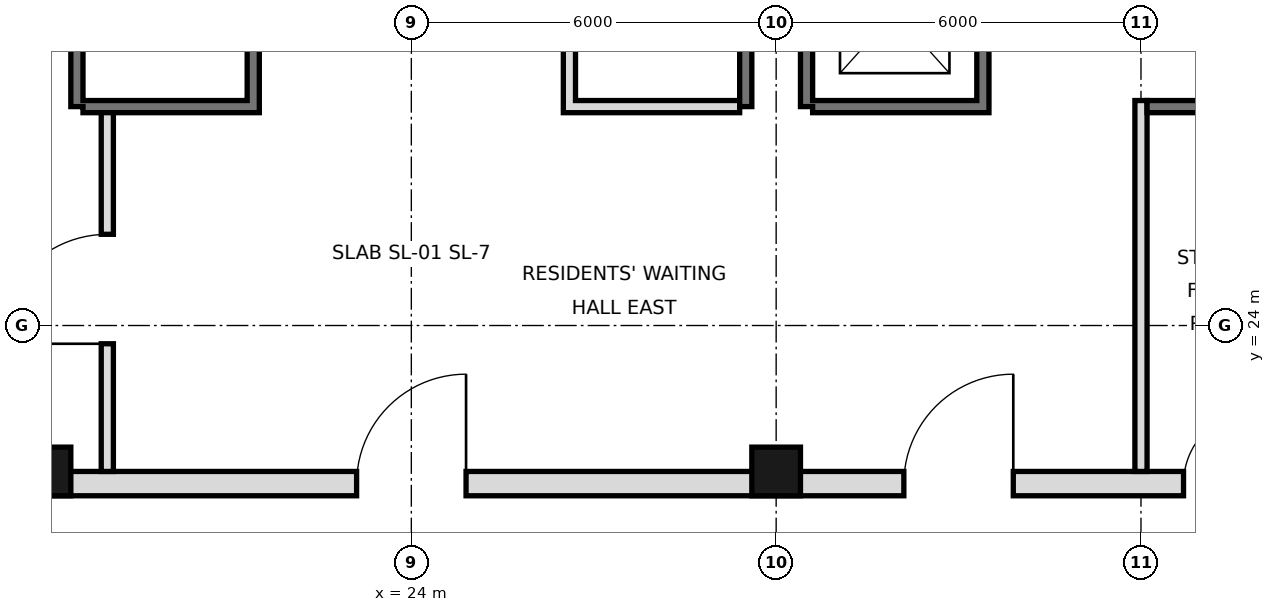
"""IFC4 building model, lengths in metres.
Left out: names, types, materials, properties, quantities, classifications, styles, units other than length and angle.
Written with IfcOpenShell. Run it as: python <this file> out.ifc"""

import sys

from ifc_helpers import new_model, si_unit, direction, frame, frame_2d, origin, origin_2d, place, context, subcontext, project, spatial, rectangle, hollow_rectangle, extrude, element, fill, save


model = new_model("IFC4")
c1 = context("Model", 3, precision=1e-05, world=origin(), true_north=direction((0.0, 1.0)))
c2 = subcontext(c1, "Body", "Model", "MODEL_VIEW")
j1 = project(units=[si_unit("LENGTHUNIT", "METRE"), si_unit("PLANEANGLEUNIT", "RADIAN")], contexts=[c1])
p1 = place(None, origin())
s1 = spatial("IfcSite", under=j1, at=p1, CompositionType="ELEMENT")
p2 = place(p1, origin())
s2 = spatial("IfcBuilding", under=s1, at=p2, CompositionType="ELEMENT")
p3 = place(p2, frame((0.0, 0.0, 174.4)))
s3 = spatial("IfcBuildingStorey", under=s2, at=p3, CompositionType="ELEMENT", Elevation=174.4)
for number, where, z_axis, x_axis in (
    (1, (18.0, 21.6, 0.0), (0.0, 0.0, 1.0), (1.0, 0.0, 0.0)),
    (2, (30.0, 21.6, 0.0), (0.0, 0.0, 1.0), (1.0, 0.0, 0.0)),
):
    element("IfcColumn", number, at=place(p3, frame(where, z_axis=z_axis, x_axis=x_axis)), inside=s3, PredefinedType="COLUMN", context=c2, shape_type="SweptSolid", body=[
        extrude(hollow_rectangle(XDim=0.8, YDim=0.8, WallThickness=0.045, at=origin_2d()), origin(), (0.0, 0.0, 1.0), 3.6),
    ])
for number, where, z_axis, x_axis in (
    (3, (18.5, 27.6, 0.0), (0.0, 0.0, 1.0), (0.0, 1.0, 0.0)),
    (4, (29.5, 27.6, 0.0), (0.0, 0.0, 1.0), (0.0, 1.0, 0.0)),
    (5, (30.5, 27.6, 0.0), (0.0, 0.0, 1.0), (0.0, 1.0, 0.0)),
):
    element("IfcWall", number, at=place(p3, frame(where, z_axis=z_axis, x_axis=x_axis)), inside=s3, PredefinedType="SOLIDWALL", context=c2, shape_type="SweptSolid", body=[
        extrude(rectangle(XDim=17.5, YDim=0.2, at=frame_2d((8.75, 0.0))), origin(), (0.0, 0.0, 1.0), 3.42),
    ])
p4 = place(p3, frame((5.6, 21.4, 0.0), z_axis=(0.0, 0.0, 1.0), x_axis=(1.0, 0.0, 0.0)))
e6 = element("IfcWall", 6, at=p4, inside=s3, PredefinedType="SOLIDWALL", context=c2, shape_type="SweptSolid", body=[
    extrude(rectangle(XDim=36.8, YDim=0.4, at=frame_2d((18.4, 0.0))), origin(), (0.0, 0.0, 1.0), 3.42),
])
p5 = place(p4, frame((8.5, 0.0, 0.0)))
e7 = element("IfcOpeningElement", 7, at=p5, cuts=e6, PredefinedType="OPENING", context=c2, shape_type="SweptSolid", body=[
    extrude(rectangle(XDim=1.8, YDim=2.1, at=frame_2d((0.9, 1.05))), frame((0.0, 0.21, 0.0), z_axis=(0.0, -1.0, 0.0), x_axis=(1.0, 0.0, 0.0)), (0.0, 0.0, 1.0), 0.42),
])
p6 = place(p4, frame((17.5, 0.0, 0.0)))
e8 = element("IfcOpeningElement", 8, at=p6, cuts=e6, PredefinedType="OPENING", context=c2, shape_type="SweptSolid", body=[
    extrude(rectangle(XDim=1.8, YDim=2.1, at=frame_2d((0.9, 1.05))), frame((0.0, 0.21, 0.0), z_axis=(0.0, -1.0, 0.0), x_axis=(1.0, 0.0, 0.0)), (0.0, 0.0, 1.0), 0.42),
])
p7 = place(p4, frame((26.5, 0.0, 0.0)))
e9 = element("IfcOpeningElement", 9, at=p7, cuts=e6, PredefinedType="OPENING", context=c2, shape_type="SweptSolid", body=[
    extrude(rectangle(XDim=1.8, YDim=2.1, at=frame_2d((0.9, 1.05))), frame((0.0, 0.21, 0.0), z_axis=(0.0, -1.0, 0.0), x_axis=(1.0, 0.0, 0.0)), (0.0, 0.0, 1.0), 0.42),
])
p8 = place(p4, frame((4.5, 0.0, 0.0)))
e10 = element("IfcOpeningElement", 10, at=p8, cuts=e6, PredefinedType="OPENING", context=c2, shape_type="SweptSolid", body=[
    extrude(rectangle(XDim=1.2, YDim=2.1, at=frame_2d((0.6, 1.05))), frame((0.0, 0.21, 0.0), z_axis=(0.0, -1.0, 0.0), x_axis=(1.0, 0.0, 0.0)), (0.0, 0.0, 1.0), 0.42),
])
p9 = place(p4, frame((31.1, 0.0, 0.0)))
e11 = element("IfcOpeningElement", 11, at=p9, cuts=e6, PredefinedType="OPENING", context=c2, shape_type="SweptSolid", body=[
    extrude(rectangle(XDim=1.2, YDim=2.1, at=frame_2d((0.6, 1.05))), frame((0.0, 0.21, 0.0), z_axis=(0.0, -1.0, 0.0), x_axis=(1.0, 0.0, 0.0)), (0.0, 0.0, 1.0), 0.42),
])
p10 = place(p3, frame((19.0, 21.6, 0.0), z_axis=(0.0, 0.0, 1.0), x_axis=(0.0, 1.0, 0.0)))
e12 = element("IfcWall", 12, at=p10, inside=s3, PredefinedType="PARTITIONING", context=c2, shape_type="SweptSolid", body=[
    extrude(rectangle(XDim=6.0, YDim=0.2, at=frame_2d((3.0, 0.0))), origin(), (0.0, 0.0, 1.0), 3.42),
])
p11 = place(p10, frame((2.1, 0.0, 0.0)))
e13 = element("IfcOpeningElement", 13, at=p11, cuts=e12, PredefinedType="OPENING", context=c2, shape_type="SweptSolid", body=[
    extrude(rectangle(XDim=1.8, YDim=2.1, at=frame_2d((0.9, 1.05))), frame((0.0, 0.11, 0.0), z_axis=(0.0, -1.0, 0.0), x_axis=(1.0, 0.0, 0.0)), (0.0, 0.0, 1.0), 0.22),
])
p12 = place(p3, frame((21.4, 27.5, 0.0), z_axis=(0.0, 0.0, 1.0), x_axis=(0.0, 1.0, 0.0)))
e14 = element("IfcWall", 14, at=p12, inside=s3, PredefinedType="SOLIDWALL", context=c2, shape_type="SweptSolid", body=[
    extrude(rectangle(XDim=17.5, YDim=0.2, at=frame_2d((8.75, 0.0))), origin(), (0.0, 0.0, 1.0), 3.42),
])
p13 = place(p12, frame((9.8, 0.0, 0.0)))
e15 = element("IfcOpeningElement", 15, at=p13, cuts=e14, PredefinedType="OPENING", context=c2, shape_type="SweptSolid", body=[
    extrude(rectangle(XDim=1.0, YDim=2.1, at=frame_2d((0.5, 1.05))), frame((0.0, 0.11, 0.0), z_axis=(0.0, -1.0, 0.0), x_axis=(1.0, 0.0, 0.0)), (0.0, 0.0, 1.0), 0.22),
])
p14 = place(p12, frame((7.4, 0.0, 0.0)))
e16 = element("IfcOpeningElement", 16, at=p14, cuts=e14, PredefinedType="OPENING", context=c2, shape_type="SweptSolid", body=[
    extrude(rectangle(XDim=0.9, YDim=2.1, at=frame_2d((0.45, 1.05))), frame((0.0, 0.11, 0.0), z_axis=(0.0, -1.0, 0.0), x_axis=(1.0, 0.0, 0.0)), (0.0, 0.0, 1.0), 0.22),
])
p15 = place(p3, frame((26.6, 27.5, 0.0), z_axis=(0.0, 0.0, 1.0), x_axis=(0.0, 1.0, 0.0)))
e17 = element("IfcWall", 17, at=p15, inside=s3, PredefinedType="SOLIDWALL", context=c2, shape_type="SweptSolid", body=[
    extrude(rectangle(XDim=17.5, YDim=0.2, at=frame_2d((8.75, 0.0))), origin(), (0.0, 0.0, 1.0), 3.42),
])
p16 = place(p15, frame((4.3, 0.0, 0.0)))
e18 = element("IfcOpeningElement", 18, at=p16, cuts=e17, PredefinedType="OPENING", context=c2, shape_type="SweptSolid", body=[
    extrude(rectangle(XDim=0.9, YDim=2.1, at=frame_2d((0.45, 1.05))), frame((0.0, 0.11, 0.0), z_axis=(0.0, -1.0, 0.0), x_axis=(1.0, 0.0, 0.0)), (0.0, 0.0, 1.0), 0.22),
])
p17 = place(p15, frame((10.35, 0.0, 0.0)))
e19 = element("IfcOpeningElement", 19, at=p17, cuts=e17, PredefinedType="OPENING", context=c2, shape_type="SweptSolid", body=[
    extrude(rectangle(XDim=1.0, YDim=2.1, at=frame_2d((0.5, 1.05))), frame((0.0, 0.11, 0.0), z_axis=(0.0, -1.0, 0.0), x_axis=(1.0, 0.0, 0.0)), (0.0, 0.0, 1.0), 0.22),
])
p18 = place(p3, frame((33.4, 27.5, 0.0), z_axis=(0.0, 0.0, 1.0), x_axis=(0.0, 1.0, 0.0)))
e20 = element("IfcWall", 20, at=p18, inside=s3, PredefinedType="SOLIDWALL", context=c2, shape_type="SweptSolid", body=[
    extrude(rectangle(XDim=17.5, YDim=0.2, at=frame_2d((8.75, 0.0))), origin(), (0.0, 0.0, 1.0), 3.42),
])
p19 = place(p18, frame((1.1, 0.0, 0.0)))
e21 = element("IfcOpeningElement", 21, at=p19, cuts=e20, PredefinedType="OPENING", context=c2, shape_type="SweptSolid", body=[
    extrude(rectangle(XDim=1.1, YDim=2.1, at=frame_2d((0.55, 1.05))), frame((0.0, 0.11, 0.0), z_axis=(0.0, -1.0, 0.0), x_axis=(1.0, 0.0, 0.0)), (0.0, 0.0, 1.0), 0.22),
])
p20 = place(p18, frame((4.2, 0.0, 0.0)))
e22 = element("IfcOpeningElement", 22, at=p20, cuts=e20, PredefinedType="OPENING", context=c2, shape_type="SweptSolid", body=[
    extrude(rectangle(XDim=1.1, YDim=2.1, at=frame_2d((0.55, 1.05))), frame((0.0, 0.11, 0.0), z_axis=(0.0, -1.0, 0.0), x_axis=(1.0, 0.0, 0.0)), (0.0, 0.0, 1.0), 0.22),
])
p21 = place(p18, frame((15.4, 0.0, 0.0)))
e23 = element("IfcOpeningElement", 23, at=p21, cuts=e20, PredefinedType="OPENING", context=c2, shape_type="SweptSolid", body=[
    extrude(rectangle(XDim=1.1, YDim=2.1, at=frame_2d((0.55, 1.05))), frame((0.0, 0.11, 0.0), z_axis=(0.0, -1.0, 0.0), x_axis=(1.0, 0.0, 0.0)), (0.0, 0.0, 1.0), 0.22),
])
p22 = place(p18, frame((9.9, 0.0, 0.0)))
e24 = element("IfcOpeningElement", 24, at=p22, cuts=e20, PredefinedType="OPENING", context=c2, shape_type="SweptSolid", body=[
    extrude(rectangle(XDim=0.9, YDim=2.1, at=frame_2d((0.45, 1.05))), frame((0.0, 0.11, 0.0), z_axis=(0.0, -1.0, 0.0), x_axis=(1.0, 0.0, 0.0)), (0.0, 0.0, 1.0), 0.22),
])
p23 = place(p3, frame((36.0, 21.6, 0.0), z_axis=(0.0, 0.0, 1.0), x_axis=(0.0, 1.0, 0.0)))
e25 = element("IfcWall", 25, at=p23, inside=s3, PredefinedType="PARTITIONING", context=c2, shape_type="SweptSolid", body=[
    extrude(rectangle(XDim=6.1, YDim=0.2, at=frame_2d((3.05, 0.0))), origin(), (0.0, 0.0, 1.0), 3.42),
])
for number, where, z_axis, x_axis in (
    (26, (18.6, 27.6, 0.0), (0.0, 0.0, 1.0), (1.0, 0.0, 0.0)),
    (27, (26.7, 27.6, 0.0), (0.0, 0.0, 1.0), (1.0, 0.0, 0.0)),
    (28, (30.6, 27.6, 0.0), (0.0, 0.0, 1.0), (1.0, 0.0, 0.0)),
):
    element("IfcWall", number, at=place(p3, frame(where, z_axis=z_axis, x_axis=x_axis)), inside=s3, PredefinedType="SOLIDWALL", context=c2, shape_type="SweptSolid", body=[
        extrude(rectangle(XDim=2.7, YDim=0.2, at=frame_2d((1.35, 0.0))), origin(), (0.0, 0.0, 1.0), 3.42),
    ])
p24 = place(p3, frame((36.1, 27.6, 0.0), z_axis=(0.0, 0.0, 1.0), x_axis=(1.0, 0.0, 0.0)))
e29 = element("IfcWall", 29, at=p24, inside=s3, PredefinedType="SOLIDWALL", context=c2, shape_type="SweptSolid", body=[
    extrude(rectangle(XDim=5.3, YDim=0.2, at=frame_2d((2.65, 0.0))), origin(), (0.0, 0.0, 1.0), 3.42),
])
p25 = place(p11, origin())
e30 = element("IfcDoor", 30, at=p25, inside=s3, OperationType="SINGLE_SWING_LEFT", PredefinedType="DOOR", context=c2, shape_type="SweptSolid", body=[
    extrude(rectangle(XDim=1.8, YDim=2.1, at=frame_2d((0.9, 1.05))), frame((0.0, 0.025, 0.0), z_axis=(0.0, -1.0, 0.0), x_axis=(1.0, 0.0, 0.0)), (0.0, 0.0, 1.0), 0.05),
])
fill(e13, e30)
p26 = place(p6, frame((1.8, 0.0, 0.0), z_axis=(0.0, 0.0, 1.0), x_axis=(-1.0, 0.0, 0.0)))
e31 = element("IfcDoor", 31, at=p26, inside=s3, OperationType="SINGLE_SWING_LEFT", PredefinedType="DOOR", context=c2, shape_type="SweptSolid", body=[
    extrude(rectangle(XDim=1.8, YDim=2.1, at=frame_2d((0.9, 1.05))), frame((0.0, 0.025, 0.0), z_axis=(0.0, -1.0, 0.0), x_axis=(1.0, 0.0, 0.0)), (0.0, 0.0, 1.0), 0.05),
])
fill(e8, e31)
p27 = place(p7, frame((1.8, 0.0, 0.0), z_axis=(0.0, 0.0, 1.0), x_axis=(-1.0, 0.0, 0.0)))
e32 = element("IfcDoor", 32, at=p27, inside=s3, OperationType="SINGLE_SWING_LEFT", PredefinedType="DOOR", context=c2, shape_type="SweptSolid", body=[
    extrude(rectangle(XDim=1.8, YDim=2.1, at=frame_2d((0.9, 1.05))), frame((0.0, 0.025, 0.0), z_axis=(0.0, -1.0, 0.0), x_axis=(1.0, 0.0, 0.0)), (0.0, 0.0, 1.0), 0.05),
])
fill(e9, e32)
p28 = place(p9, frame((1.2, 0.0, 0.0), z_axis=(0.0, 0.0, 1.0), x_axis=(-1.0, 0.0, 0.0)))
e33 = element("IfcDoor", 33, at=p28, inside=s3, OperationType="SINGLE_SWING_LEFT", PredefinedType="DOOR", context=c2, shape_type="SweptSolid", body=[
    extrude(rectangle(XDim=1.2, YDim=2.1, at=frame_2d((0.6, 1.05))), frame((0.0, 0.025, 0.0), z_axis=(0.0, -1.0, 0.0), x_axis=(1.0, 0.0, 0.0)), (0.0, 0.0, 1.0), 0.05),
])
fill(e11, e33)
save(model, sys.argv[1])
